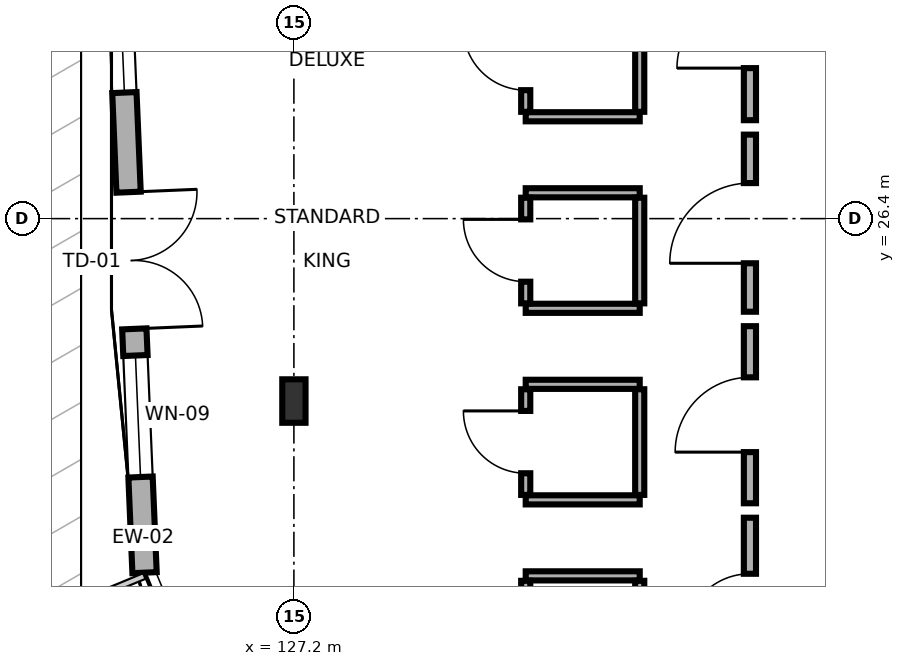
"""IFC4 building model, lengths in metres.
Left out: names, types, materials, properties, quantities, classifications, styles, units other than length and angle.
Written with IfcOpenShell. Run it as: python <this file> out.ifc"""

import sys

from ifc_helpers import new_model, si_unit, direction, frame, frame_2d, origin, origin_2d, place, context, subcontext, project, spatial, rectangle, i_section, extrude, element, fill, save


model = new_model("IFC4")
c1 = context("Model", 3, precision=1e-05, world=origin(), true_north=direction((0.0, 1.0)))
c2 = subcontext(c1, "Body", "Model", "MODEL_VIEW")
j1 = project(units=[si_unit("LENGTHUNIT", "METRE"), si_unit("PLANEANGLEUNIT", "RADIAN")], contexts=[c1])
p1 = place(None, origin())
s1 = spatial("IfcSite", under=j1, at=p1, CompositionType="ELEMENT")
p2 = place(p1, origin())
s2 = spatial("IfcBuilding", under=s1, at=p2, CompositionType="ELEMENT")
p3 = place(p2, frame((0.0, 0.0, 14.7)))
s3 = spatial("IfcBuildingStorey", under=s2, at=p3, CompositionType="ELEMENT", Elevation=14.7)
p4 = place(p3, frame((127.2, 24.0, 0.0), z_axis=(0.0, 0.0, 1.0), x_axis=(1.0, 0.0, 0.0)))
e1 = element("IfcColumn", 1, at=p4, inside=s3, PredefinedType="COLUMN", context=c2, shape_type="SweptSolid", body=[
    extrude(i_section(OverallWidth=0.306, OverallDepth=0.572, WebThickness=0.021, FlangeThickness=0.04, FilletRadius=0.027, at=origin_2d()), origin(), (0.0, 0.0, 1.0), 3.4),
])
p5 = place(p3, frame((124.89, 29.955, 0.0), z_axis=(0.0, 0.0, 1.0), x_axis=(0.041996210664, -0.99911776998, 0.0)))
e2 = element("IfcWall", 2, at=p5, inside=s3, PredefinedType="SOLIDWALL", context=c2, shape_type="SweptSolid", body=[
    extrude(rectangle(XDim=8.22, YDim=0.32, at=frame_2d((4.11, 0.0))), origin(), (0.0, 0.0, 1.0), 2.75),
])
p6 = place(p5, frame((3.21, 0.0, 0.0)))
e3 = element("IfcOpeningElement", 3, at=p6, cuts=e2, PredefinedType="OPENING", context=c2, shape_type="SweptSolid", body=[
    extrude(rectangle(XDim=1.8, YDim=2.2, at=frame_2d((0.9, 1.1))), frame((0.0, 0.17, 0.0), z_axis=(0.0, -1.0, 0.0), x_axis=(1.0, 0.0, 0.0)), (0.0, 0.0, 1.0), 0.34),
])
p7 = place(p5, frame((0.299, 0.0, 0.8)))
e4 = element("IfcOpeningElement", 4, at=p7, cuts=e2, PredefinedType="OPENING", context=c2, shape_type="SweptSolid", body=[
    extrude(rectangle(XDim=1.6, YDim=1.5, at=frame_2d((0.8, 0.75))), frame((0.0, 0.17, 0.0), z_axis=(0.0, -1.0, 0.0), x_axis=(1.0, 0.0, 0.0)), (0.0, 0.0, 1.0), 0.34),
])
p8 = place(p5, frame((5.361, 0.0, 0.8)))
e5 = element("IfcOpeningElement", 5, at=p8, cuts=e2, PredefinedType="OPENING", context=c2, shape_type="SweptSolid", body=[
    extrude(rectangle(XDim=1.6, YDim=1.5, at=frame_2d((0.8, 0.75))), frame((0.0, 0.17, 0.0), z_axis=(0.0, -1.0, 0.0), x_axis=(1.0, 0.0, 0.0)), (0.0, 0.0, 1.0), 0.34),
])
p9 = place(p3, frame((133.2, 27.695, 0.0), z_axis=(0.0, 0.0, 1.0), x_axis=(0.0, 1.0, 0.0)))
e6 = element("IfcWall", 6, at=p9, inside=s3, PredefinedType="PARTITIONING", context=c2, shape_type="SweptSolid", body=[
    extrude(rectangle(XDim=2.33, YDim=0.16, at=frame_2d((1.165, 0.0))), origin(), (0.0, 0.0, 1.0), 3.215),
])
p10 = place(p9, frame((0.685, 0.0, 0.0)))
e7 = element("IfcOpeningElement", 7, at=p10, cuts=e6, PredefinedType="OPENING", context=c2, shape_type="SweptSolid", body=[
    extrude(rectangle(XDim=0.96, YDim=2.13, at=frame_2d((0.48, 1.065))), frame((0.0, 0.09, 0.0), z_axis=(0.0, -1.0, 0.0), x_axis=(1.0, 0.0, 0.0)), (0.0, 0.0, 1.0), 0.18),
])
p11 = place(p3, frame((130.25, 27.74, 0.0), z_axis=(0.0, 0.0, 1.0), x_axis=(1.0, 0.0, 0.0)))
e8 = element("IfcWall", 8, at=p11, inside=s3, PredefinedType="PARTITIONING", context=c2, shape_type="SweptSolid", body=[
    extrude(rectangle(XDim=1.5, YDim=0.12, at=frame_2d((0.75, 0.0))), origin(), (0.0, 0.0, 1.0), 3.215),
])
p12 = place(p3, frame((130.25, 27.805, 0.0), z_axis=(0.0, 0.0, 1.0), x_axis=(0.0, 1.0, 0.0)))
e9 = element("IfcWall", 9, at=p12, inside=s3, PredefinedType="PARTITIONING", context=c2, shape_type="SweptSolid", body=[
    extrude(rectangle(XDim=1.39, YDim=0.12, at=frame_2d((0.695, 0.0))), origin(), (0.0, 0.0, 1.0), 3.215),
])
p13 = place(p12, frame((0.285, 0.0, 0.0)))
e10 = element("IfcOpeningElement", 10, at=p13, cuts=e9, PredefinedType="OPENING", context=c2, shape_type="SweptSolid", body=[
    extrude(rectangle(XDim=0.82, YDim=2.08, at=frame_2d((0.41, 1.04))), frame((0.0, 0.07, 0.0), z_axis=(0.0, -1.0, 0.0), x_axis=(1.0, 0.0, 0.0)), (0.0, 0.0, 1.0), 0.14),
])
p14 = place(p3, frame((131.75, 27.805, 0.0), z_axis=(0.0, 0.0, 1.0), x_axis=(0.0, 1.0, 0.0)))
e11 = element("IfcWall", 11, at=p14, inside=s3, PredefinedType="PARTITIONING", context=c2, shape_type="SweptSolid", body=[
    extrude(rectangle(XDim=1.39, YDim=0.12, at=frame_2d((0.695, 0.0))), origin(), (0.0, 0.0, 1.0), 3.215),
])
p15 = place(p3, frame((133.2, 25.175, 0.0), z_axis=(0.0, 0.0, 1.0), x_axis=(0.0, 1.0, 0.0)))
e12 = element("IfcWall", 12, at=p15, inside=s3, PredefinedType="PARTITIONING", context=c2, shape_type="SweptSolid", body=[
    extrude(rectangle(XDim=2.33, YDim=0.16, at=frame_2d((1.165, 0.0))), origin(), (0.0, 0.0, 1.0), 3.215),
])
p16 = place(p15, frame((0.637, 0.0, 0.0)))
e13 = element("IfcOpeningElement", 13, at=p16, cuts=e12, PredefinedType="OPENING", context=c2, shape_type="SweptSolid", body=[
    extrude(rectangle(XDim=1.055, YDim=2.05, at=frame_2d((0.527, 1.025))), frame((0.0, 0.09, 0.0), z_axis=(0.0, -1.0, 0.0), x_axis=(1.0, 0.0, 0.0)), (0.0, 0.0, 1.0), 0.18),
])
for number, where, z_axis, x_axis in (
    (14, (130.25, 25.22, 0.0), (0.0, 0.0, 1.0), (1.0, 0.0, 0.0)),
    (15, (130.25, 26.74, 0.0), (0.0, 0.0, 1.0), (1.0, 0.0, 0.0)),
):
    element("IfcWall", number, at=place(p3, frame(where, z_axis=z_axis, x_axis=x_axis)), inside=s3, PredefinedType="PARTITIONING", context=c2, shape_type="SweptSolid", body=[
        extrude(rectangle(XDim=1.5, YDim=0.12, at=frame_2d((0.75, 0.0))), origin(), (0.0, 0.0, 1.0), 3.215),
    ])
p17 = place(p3, frame((130.25, 25.285, 0.0), z_axis=(0.0, 0.0, 1.0), x_axis=(0.0, 1.0, 0.0)))
e16 = element("IfcWall", 16, at=p17, inside=s3, PredefinedType="PARTITIONING", context=c2, shape_type="SweptSolid", body=[
    extrude(rectangle(XDim=1.39, YDim=0.12, at=frame_2d((0.695, 0.0))), origin(), (0.0, 0.0, 1.0), 3.215),
])
p18 = place(p17, frame((0.285, 0.0, 0.0)))
e17 = element("IfcOpeningElement", 17, at=p18, cuts=e16, PredefinedType="OPENING", context=c2, shape_type="SweptSolid", body=[
    extrude(rectangle(XDim=0.82, YDim=2.08, at=frame_2d((0.41, 1.04))), frame((0.0, 0.07, 0.0), z_axis=(0.0, -1.0, 0.0), x_axis=(1.0, 0.0, 0.0)), (0.0, 0.0, 1.0), 0.14),
])
p19 = place(p3, frame((131.75, 25.285, 0.0), z_axis=(0.0, 0.0, 1.0), x_axis=(0.0, 1.0, 0.0)))
e18 = element("IfcWall", 18, at=p19, inside=s3, PredefinedType="PARTITIONING", context=c2, shape_type="SweptSolid", body=[
    extrude(rectangle(XDim=1.39, YDim=0.12, at=frame_2d((0.695, 0.0))), origin(), (0.0, 0.0, 1.0), 3.215),
])
p20 = place(p3, frame((133.2, 22.655, 0.0), z_axis=(0.0, 0.0, 1.0), x_axis=(0.0, 1.0, 0.0)))
e19 = element("IfcWall", 19, at=p20, inside=s3, PredefinedType="PARTITIONING", context=c2, shape_type="SweptSolid", body=[
    extrude(rectangle(XDim=2.33, YDim=0.16, at=frame_2d((1.165, 0.0))), origin(), (0.0, 0.0, 1.0), 2.75),
])
p21 = place(p20, frame((0.673, 0.0, 0.0)))
e20 = element("IfcOpeningElement", 20, at=p21, cuts=e19, PredefinedType="OPENING", context=c2, shape_type="SweptSolid", body=[
    extrude(rectangle(XDim=0.984, YDim=2.07, at=frame_2d((0.492, 1.035))), frame((0.0, 0.09, 0.0), z_axis=(0.0, -1.0, 0.0), x_axis=(1.0, 0.0, 0.0)), (0.0, 0.0, 1.0), 0.18),
])
p22 = place(p3, frame((130.25, 22.7, 0.0), z_axis=(0.0, 0.0, 1.0), x_axis=(1.0, 0.0, 0.0)))
e21 = element("IfcWall", 21, at=p22, inside=s3, PredefinedType="PARTITIONING", context=c2, shape_type="SweptSolid", body=[
    extrude(rectangle(XDim=1.5, YDim=0.12, at=frame_2d((0.75, 0.0))), origin(), (0.0, 0.0, 1.0), 3.215),
])
p23 = place(p3, frame((130.25, 24.22, 0.0), z_axis=(0.0, 0.0, 1.0), x_axis=(1.0, 0.0, 0.0)))
e22 = element("IfcWall", 22, at=p23, inside=s3, PredefinedType="PARTITIONING", context=c2, shape_type="SweptSolid", body=[
    extrude(rectangle(XDim=1.5, YDim=0.12, at=frame_2d((0.75, 0.0))), origin(), (0.0, 0.0, 1.0), 2.75),
])
p24 = place(p3, frame((130.25, 22.765, 0.0), z_axis=(0.0, 0.0, 1.0), x_axis=(0.0, 1.0, 0.0)))
e23 = element("IfcWall", 23, at=p24, inside=s3, PredefinedType="PARTITIONING", context=c2, shape_type="SweptSolid", body=[
    extrude(rectangle(XDim=1.39, YDim=0.12, at=frame_2d((0.695, 0.0))), origin(), (0.0, 0.0, 1.0), 2.75),
])
p25 = place(p24, frame((0.285, 0.0, 0.0)))
e24 = element("IfcOpeningElement", 24, at=p25, cuts=e23, PredefinedType="OPENING", context=c2, shape_type="SweptSolid", body=[
    extrude(rectangle(XDim=0.82, YDim=2.08, at=frame_2d((0.41, 1.04))), frame((0.0, 0.07, 0.0), z_axis=(0.0, -1.0, 0.0), x_axis=(1.0, 0.0, 0.0)), (0.0, 0.0, 1.0), 0.14),
])
p26 = place(p3, frame((131.75, 22.765, 0.0), z_axis=(0.0, 0.0, 1.0), x_axis=(0.0, 1.0, 0.0)))
e25 = element("IfcWall", 25, at=p26, inside=s3, PredefinedType="PARTITIONING", context=c2, shape_type="SweptSolid", body=[
    extrude(rectangle(XDim=1.39, YDim=0.12, at=frame_2d((0.695, 0.0))), origin(), (0.0, 0.0, 1.0), 2.75),
])
p27 = place(p3, frame((133.2, 20.135, 0.0), z_axis=(0.0, 0.0, 1.0), x_axis=(0.0, 1.0, 0.0)))
e26 = element("IfcWall", 26, at=p27, inside=s3, PredefinedType="PARTITIONING", context=c2, shape_type="SweptSolid", body=[
    extrude(rectangle(XDim=2.33, YDim=0.16, at=frame_2d((1.165, 0.0))), origin(), (0.0, 0.0, 1.0), 3.215),
])
p28 = place(p27, frame((0.738, 0.0, 0.0)))
e27 = element("IfcOpeningElement", 27, at=p28, cuts=e26, PredefinedType="OPENING", context=c2, shape_type="SweptSolid", body=[
    extrude(rectangle(XDim=0.855, YDim=2.05, at=frame_2d((0.427, 1.025))), frame((0.0, 0.09, 0.0), z_axis=(0.0, -1.0, 0.0), x_axis=(1.0, 0.0, 0.0)), (0.0, 0.0, 1.0), 0.18),
])
p29 = place(p3, frame((130.25, 21.7, 0.0), z_axis=(0.0, 0.0, 1.0), x_axis=(1.0, 0.0, 0.0)))
e28 = element("IfcWall", 28, at=p29, inside=s3, PredefinedType="PARTITIONING", context=c2, shape_type="SweptSolid", body=[
    extrude(rectangle(XDim=1.5, YDim=0.12, at=frame_2d((0.75, 0.0))), origin(), (0.0, 0.0, 1.0), 3.215),
])
p30 = place(p3, frame((130.25, 20.245, 0.0), z_axis=(0.0, 0.0, 1.0), x_axis=(0.0, 1.0, 0.0)))
e29 = element("IfcWall", 29, at=p30, inside=s3, PredefinedType="PARTITIONING", context=c2, shape_type="SweptSolid", body=[
    extrude(rectangle(XDim=1.39, YDim=0.12, at=frame_2d((0.695, 0.0))), origin(), (0.0, 0.0, 1.0), 3.215),
])
p31 = place(p30, frame((0.285, 0.0, 0.0)))
e30 = element("IfcOpeningElement", 30, at=p31, cuts=e29, PredefinedType="OPENING", context=c2, shape_type="SweptSolid", body=[
    extrude(rectangle(XDim=0.82, YDim=2.08, at=frame_2d((0.41, 1.04))), frame((0.0, 0.07, 0.0), z_axis=(0.0, -1.0, 0.0), x_axis=(1.0, 0.0, 0.0)), (0.0, 0.0, 1.0), 0.14),
])
p32 = place(p3, frame((131.75, 20.245, 0.0), z_axis=(0.0, 0.0, 1.0), x_axis=(0.0, 1.0, 0.0)))
e31 = element("IfcWall", 31, at=p32, inside=s3, PredefinedType="PARTITIONING", context=c2, shape_type="SweptSolid", body=[
    extrude(rectangle(XDim=1.39, YDim=0.12, at=frame_2d((0.695, 0.0))), origin(), (0.0, 0.0, 1.0), 3.215),
])
p33 = place(p6, origin())
e32 = element("IfcDoor", 32, at=p33, inside=s3, OperationType="DOUBLE_DOOR_SINGLE_SWING", PredefinedType="DOOR", context=c2, shape_type="SweptSolid", body=[
    extrude(rectangle(XDim=1.8, YDim=2.2, at=frame_2d((0.9, 1.1))), frame((0.0, 0.025, 0.0), z_axis=(0.0, -1.0, 0.0), x_axis=(1.0, 0.0, 0.0)), (0.0, 0.0, 1.0), 0.05),
])
fill(e3, e32)
p34 = place(p7, origin())
e33 = element("IfcWindow", 33, at=p34, inside=s3, PartitioningType="SINGLE_PANEL", PredefinedType="WINDOW", context=c2, shape_type="SweptSolid", body=[
    extrude(rectangle(XDim=1.6, YDim=1.5, at=frame_2d((0.8, 0.75))), frame((0.0, 0.03, 0.0), z_axis=(0.0, -1.0, 0.0), x_axis=(1.0, 0.0, 0.0)), (0.0, 0.0, 1.0), 0.06),
])
fill(e4, e33)
p35 = place(p8, origin())
e34 = element("IfcWindow", 34, at=p35, inside=s3, PartitioningType="SINGLE_PANEL", PredefinedType="WINDOW", context=c2, shape_type="SweptSolid", body=[
    extrude(rectangle(XDim=1.6, YDim=1.5, at=frame_2d((0.8, 0.75))), frame((0.0, 0.03, 0.0), z_axis=(0.0, -1.0, 0.0), x_axis=(1.0, 0.0, 0.0)), (0.0, 0.0, 1.0), 0.06),
])
fill(e5, e34)
p36 = place(p10, origin())
e35 = element("IfcDoor", 35, at=p36, inside=s3, OperationType="SINGLE_SWING_LEFT", PredefinedType="DOOR", context=c2, shape_type="SweptSolid", body=[
    extrude(rectangle(XDim=0.96, YDim=2.13, at=frame_2d((0.48, 1.065))), frame((0.0, 0.025, 0.0), z_axis=(0.0, -1.0, 0.0), x_axis=(1.0, 0.0, 0.0)), (0.0, 0.0, 1.0), 0.05),
])
fill(e7, e35)
p37 = place(p13, origin())
e36 = element("IfcDoor", 36, at=p37, inside=s3, OperationType="SINGLE_SWING_RIGHT", PredefinedType="DOOR", context=c2, shape_type="SweptSolid", body=[
    extrude(rectangle(XDim=0.82, YDim=2.08, at=frame_2d((0.41, 1.04))), frame((0.0, 0.025, 0.0), z_axis=(0.0, -1.0, 0.0), x_axis=(1.0, 0.0, 0.0)), (0.0, 0.0, 1.0), 0.05),
])
fill(e10, e36)
p38 = place(p16, origin())
e37 = element("IfcDoor", 37, at=p38, inside=s3, OperationType="SINGLE_SWING_LEFT", PredefinedType="DOOR", context=c2, shape_type="SweptSolid", body=[
    extrude(rectangle(XDim=1.055, YDim=2.05, at=frame_2d((0.527, 1.025))), frame((0.0, 0.025, 0.0), z_axis=(0.0, -1.0, 0.0), x_axis=(1.0, 0.0, 0.0)), (0.0, 0.0, 1.0), 0.05),
])
fill(e13, e37)
p39 = place(p18, origin())
e38 = element("IfcDoor", 38, at=p39, inside=s3, OperationType="SINGLE_SWING_RIGHT", PredefinedType="DOOR", context=c2, shape_type="SweptSolid", body=[
    extrude(rectangle(XDim=0.82, YDim=2.08, at=frame_2d((0.41, 1.04))), frame((0.0, 0.025, 0.0), z_axis=(0.0, -1.0, 0.0), x_axis=(1.0, 0.0, 0.0)), (0.0, 0.0, 1.0), 0.05),
])
fill(e17, e38)
p40 = place(p21, origin())
e39 = element("IfcDoor", 39, at=p40, inside=s3, OperationType="SINGLE_SWING_LEFT", PredefinedType="DOOR", context=c2, shape_type="SweptSolid", body=[
    extrude(rectangle(XDim=0.984, YDim=2.07, at=frame_2d((0.492, 1.035))), frame((0.0, 0.025, 0.0), z_axis=(0.0, -1.0, 0.0), x_axis=(1.0, 0.0, 0.0)), (0.0, 0.0, 1.0), 0.05),
])
fill(e20, e39)
p41 = place(p25, origin())
e40 = element("IfcDoor", 40, at=p41, inside=s3, OperationType="SINGLE_SWING_RIGHT", PredefinedType="DOOR", context=c2, shape_type="SweptSolid", body=[
    extrude(rectangle(XDim=0.82, YDim=2.08, at=frame_2d((0.41, 1.04))), frame((0.0, 0.025, 0.0), z_axis=(0.0, -1.0, 0.0), x_axis=(1.0, 0.0, 0.0)), (0.0, 0.0, 1.0), 0.05),
])
fill(e24, e40)
p42 = place(p28, origin())
e41 = element("IfcDoor", 41, at=p42, inside=s3, OperationType="SINGLE_SWING_LEFT", PredefinedType="DOOR", context=c2, shape_type="SweptSolid", body=[
    extrude(rectangle(XDim=0.855, YDim=2.05, at=frame_2d((0.427, 1.025))), frame((0.0, 0.025, 0.0), z_axis=(0.0, -1.0, 0.0), x_axis=(1.0, 0.0, 0.0)), (0.0, 0.0, 1.0), 0.05),
])
fill(e27, e41)
save(model, sys.argv[1])
